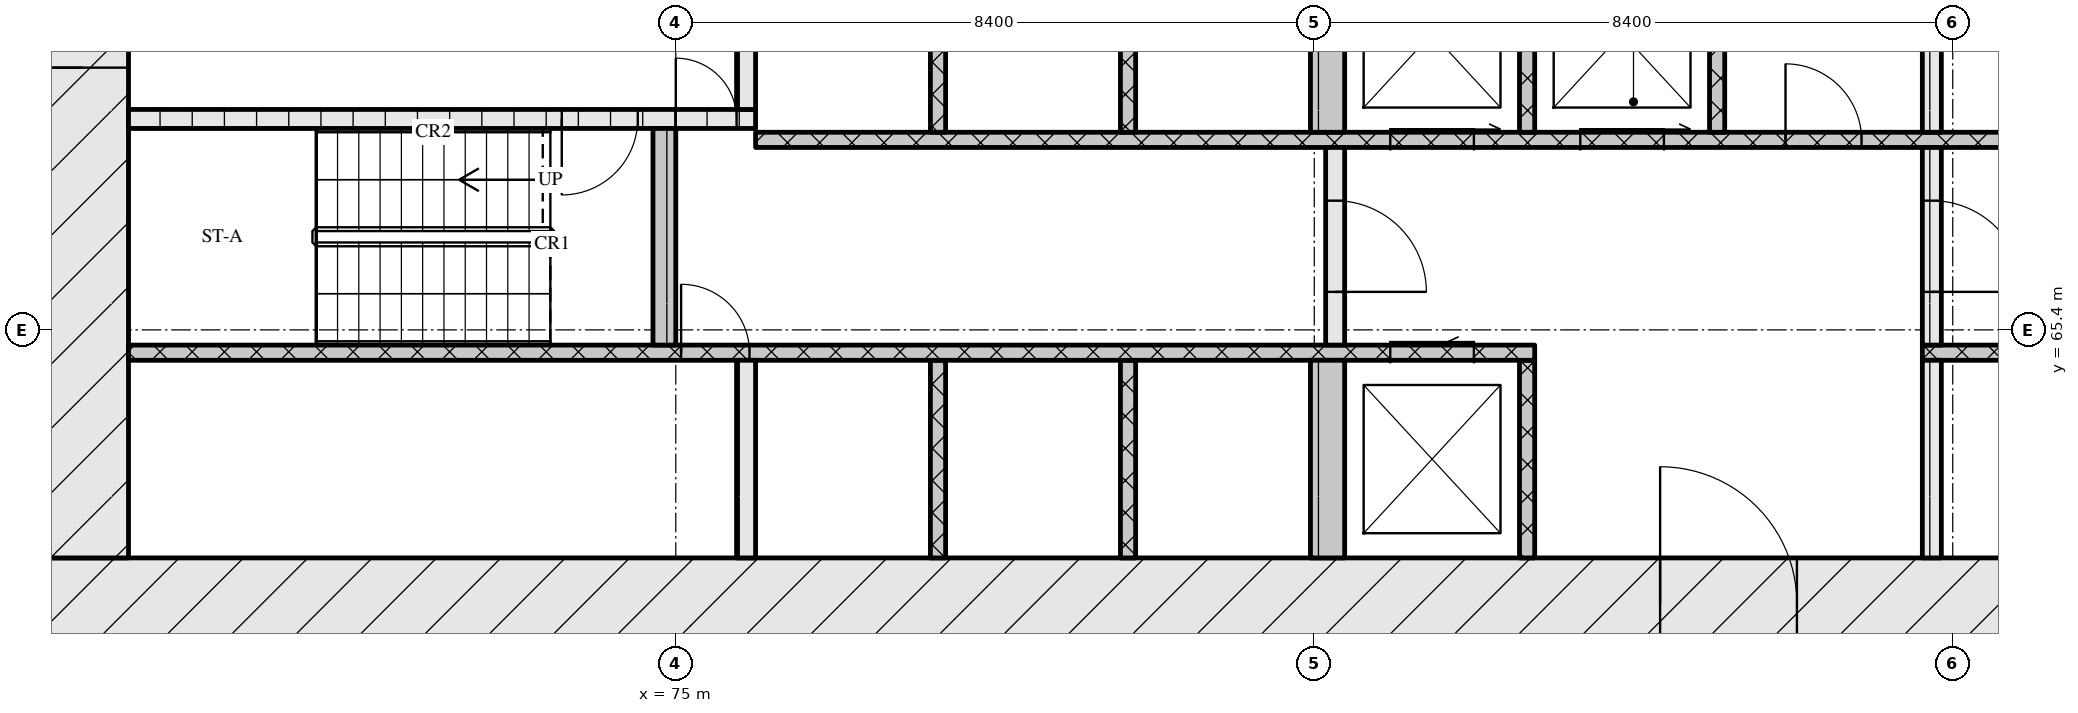
"""IFC4 building model, lengths in metres.
Left out: names, types, materials, properties, quantities, classifications, styles, units other than length and angle.
Written with IfcOpenShell. Run it as: python <this file> out.ifc"""

import sys

from ifc_helpers import new_model, si_unit, direction, frame, frame_2d, origin, place, context, subcontext, project, spatial, rectangle, extrude, element, fill, save


model = new_model("IFC4")
c1 = context("Model", 3, precision=1e-05, world=origin(), true_north=direction((0.0, 1.0)))
c2 = subcontext(c1, "Body", "Model", "MODEL_VIEW")
j1 = project(units=[si_unit("LENGTHUNIT", "METRE"), si_unit("PLANEANGLEUNIT", "RADIAN")], contexts=[c1])
p1 = place(None, origin())
s1 = spatial("IfcSite", under=j1, at=p1, CompositionType="ELEMENT")
p2 = place(p1, origin())
s2 = spatial("IfcBuilding", under=s1, at=p2, CompositionType="ELEMENT")
p3 = place(p2, frame((0.0, 0.0, 32.7)))
s3 = spatial("IfcBuildingStorey", under=s2, at=p3, CompositionType="ELEMENT", Elevation=32.7)
p4 = place(p3, frame((66.6, 61.8, 0.0), z_axis=(0.0, 0.0, 1.0), x_axis=(1.0, 0.0, 0.0)))
e1 = element("IfcWall", 1, at=p4, inside=s3, PredefinedType="SOLIDWALL", context=c2, shape_type="SweptSolid", body=[
    extrude(rectangle(XDim=42.0, YDim=1.2, at=frame_2d((21.0, 0.0))), origin(), (0.0, 0.0, 1.0), 4.22),
])
p5 = place(p4, frame((21.35, 0.0, 0.0)))
e2 = element("IfcOpeningElement", 2, at=p5, cuts=e1, PredefinedType="OPENING", context=c2, shape_type="SweptSolid", body=[
    extrude(rectangle(XDim=1.8, YDim=2.1, at=frame_2d((0.9, 1.05))), frame((0.0, 0.61, 0.0), z_axis=(0.0, -1.0, 0.0), x_axis=(1.0, 0.0, 0.0)), (0.0, 0.0, 1.0), 1.22),
])
p6 = place(p3, frame((67.2, 62.4, 0.0), z_axis=(0.0, 0.0, 1.0), x_axis=(0.0, 1.0, 0.0)))
e3 = element("IfcWall", 3, at=p6, inside=s3, PredefinedType="SOLIDWALL", context=c2, shape_type="SweptSolid", body=[
    extrude(rectangle(XDim=12.0, YDim=1.2, at=frame_2d((6.0, 0.0))), origin(), (0.0, 0.0, 1.0), 4.22),
])
p7 = place(p6, frame((6.45, 0.0, 0.0)))
e4 = element("IfcOpeningElement", 4, at=p7, cuts=e3, PredefinedType="OPENING", context=c2, shape_type="SweptSolid", body=[
    extrude(rectangle(XDim=1.2, YDim=2.1, at=frame_2d((0.6, 1.05))), frame((0.0, 0.61, 0.0), z_axis=(0.0, -1.0, 0.0), x_axis=(1.0, 0.0, 0.0)), (0.0, 0.0, 1.0), 1.22),
])
p8 = place(p3, frame((75.925, 62.4, 0.0), z_axis=(0.0, 0.0, 1.0), x_axis=(0.0, 1.0, 0.0)))
e5 = element("IfcWall", 5, at=p8, inside=s3, PredefinedType="SOLIDWALL", context=c2, shape_type="SweptSolid", body=[
    extrude(rectangle(XDim=2.6, YDim=0.25, at=frame_2d((1.3, 0.0))), origin(), (0.0, 0.0, 1.0), 4.22),
])
for number, where, z_axis, x_axis in (
    (6, (78.45, 62.4, 0.0), (0.0, 0.0, 1.0), (0.0, 1.0, 0.0)),
    (7, (80.95, 62.4, 0.0), (0.0, 0.0, 1.0), (0.0, 1.0, 0.0)),
):
    element("IfcWall", number, at=place(p3, frame(where, z_axis=z_axis, x_axis=x_axis)), inside=s3, PredefinedType="SOLIDWALL", context=c2, shape_type="SweptSolid", body=[
        extrude(rectangle(XDim=2.6, YDim=0.2, at=frame_2d((1.3, 0.0))), origin(), (0.0, 0.0, 1.0), 4.22),
    ])
p9 = place(p3, frame((83.575, 62.4, 0.0), z_axis=(0.0, 0.0, 1.0), x_axis=(0.0, 1.0, 0.0)))
e8 = element("IfcWall", 8, at=p9, inside=s3, PredefinedType="SOLIDWALL", context=c2, shape_type="SweptSolid", body=[
    extrude(rectangle(XDim=2.6, YDim=0.45, at=frame_2d((1.3, 0.0))), origin(), (0.0, 0.0, 1.0), 4.22),
])
p10 = place(p3, frame((86.2, 62.4, 0.0), z_axis=(0.0, 0.0, 1.0), x_axis=(0.0, 1.0, 0.0)))
e9 = element("IfcWall", 9, at=p10, inside=s3, PredefinedType="SOLIDWALL", context=c2, shape_type="SweptSolid", body=[
    extrude(rectangle(XDim=2.6, YDim=0.2, at=frame_2d((1.3, 0.0))), origin(), (0.0, 0.0, 1.0), 4.22),
])
p11 = place(p3, frame((91.525, 62.4, 0.0), z_axis=(0.0, 0.0, 1.0), x_axis=(0.0, 1.0, 0.0)))
e10 = element("IfcWall", 10, at=p11, inside=s3, PredefinedType="SOLIDWALL", context=c2, shape_type="SweptSolid", body=[
    extrude(rectangle(XDim=2.6, YDim=0.25, at=frame_2d((1.3, 0.0))), origin(), (0.0, 0.0, 1.0), 4.22),
])
p12 = place(p3, frame((67.8, 65.1, 0.0), z_axis=(0.0, 0.0, 1.0), x_axis=(1.0, 0.0, 0.0)))
e11 = element("IfcWall", 11, at=p12, inside=s3, PredefinedType="SOLIDWALL", context=c2, shape_type="SweptSolid", body=[
    extrude(rectangle(XDim=18.5, YDim=0.2, at=frame_2d((9.25, 0.0))), origin(), (0.0, 0.0, 1.0), 4.22),
])
p13 = place(p12, frame((7.27, 0.0, 0.0)))
e12 = element("IfcOpeningElement", 12, at=p13, cuts=e11, PredefinedType="OPENING", context=c2, shape_type="SweptSolid", body=[
    extrude(rectangle(XDim=0.9, YDim=2.1, at=frame_2d((0.45, 1.05))), frame((0.0, 0.11, 0.0), z_axis=(0.0, -1.0, 0.0), x_axis=(1.0, 0.0, 0.0)), (0.0, 0.0, 1.0), 0.22),
])
p14 = place(p12, frame((16.6, 0.0, 0.0)))
e13 = element("IfcOpeningElement", 13, at=p14, cuts=e11, PredefinedType="OPENING", context=c2, shape_type="SweptSolid", body=[
    extrude(rectangle(XDim=1.1, YDim=2.1, at=frame_2d((0.55, 1.05))), frame((0.0, 0.11, 0.0), z_axis=(0.0, -1.0, 0.0), x_axis=(1.0, 0.0, 0.0)), (0.0, 0.0, 1.0), 0.22),
])
p15 = place(p3, frame((91.4, 65.1, 0.0), z_axis=(0.0, 0.0, 1.0), x_axis=(1.0, 0.0, 0.0)))
e14 = element("IfcWall", 14, at=p15, inside=s3, PredefinedType="SOLIDWALL", context=c2, shape_type="SweptSolid", body=[
    extrude(rectangle(XDim=16.0, YDim=0.2, at=frame_2d((8.0, 0.0))), origin(), (0.0, 0.0, 1.0), 4.22),
])
p16 = place(p15, frame((7.83, 0.0, 0.0)))
e15 = element("IfcOpeningElement", 15, at=p16, cuts=e14, PredefinedType="OPENING", context=c2, shape_type="SweptSolid", body=[
    extrude(rectangle(XDim=0.9, YDim=2.1, at=frame_2d((0.45, 1.05))), frame((0.0, 0.11, 0.0), z_axis=(0.0, -1.0, 0.0), x_axis=(1.0, 0.0, 0.0)), (0.0, 0.0, 1.0), 0.22),
])
p17 = place(p3, frame((74.85, 65.2, 0.0), z_axis=(0.0, 0.0, 1.0), x_axis=(0.0, 1.0, 0.0)))
e16 = element("IfcWall", 16, at=p17, inside=s3, PredefinedType="SOLIDWALL", context=c2, shape_type="SweptSolid", body=[
    extrude(rectangle(XDim=2.85, YDim=0.3, at=frame_2d((1.425, 0.0))), origin(), (0.0, 0.0, 1.0), 4.22),
])
p18 = place(p3, frame((83.675, 65.2, 0.0), z_axis=(0.0, 0.0, 1.0), x_axis=(0.0, 1.0, 0.0)))
e17 = element("IfcWall", 17, at=p18, inside=s3, PredefinedType="SOLIDWALL", context=c2, shape_type="SweptSolid", body=[
    extrude(rectangle(XDim=2.6, YDim=0.25, at=frame_2d((1.3, 0.0))), origin(), (0.0, 0.0, 1.0), 4.22),
])
p19 = place(p18, frame((0.7, 0.0, 0.0)))
e18 = element("IfcOpeningElement", 18, at=p19, cuts=e17, PredefinedType="OPENING", context=c2, shape_type="SweptSolid", body=[
    extrude(rectangle(XDim=1.2, YDim=2.1, at=frame_2d((0.6, 1.05))), frame((0.0, 0.135, 0.0), z_axis=(0.0, -1.0, 0.0), x_axis=(1.0, 0.0, 0.0)), (0.0, 0.0, 1.0), 0.27),
])
p20 = place(p3, frame((91.525, 65.2, 0.0), z_axis=(0.0, 0.0, 1.0), x_axis=(0.0, 1.0, 0.0)))
e19 = element("IfcWall", 19, at=p20, inside=s3, PredefinedType="SOLIDWALL", context=c2, shape_type="SweptSolid", body=[
    extrude(rectangle(XDim=2.6, YDim=0.25, at=frame_2d((1.3, 0.0))), origin(), (0.0, 0.0, 1.0), 4.22),
])
p21 = place(p20, frame((0.7, 0.0, 0.0)))
e20 = element("IfcOpeningElement", 20, at=p21, cuts=e19, PredefinedType="OPENING", context=c2, shape_type="SweptSolid", body=[
    extrude(rectangle(XDim=1.2, YDim=2.1, at=frame_2d((0.6, 1.05))), frame((0.0, 0.135, 0.0), z_axis=(0.0, -1.0, 0.0), x_axis=(1.0, 0.0, 0.0)), (0.0, 0.0, 1.0), 0.27),
])
p22 = place(p3, frame((76.05, 67.9, 0.0), z_axis=(0.0, 0.0, 1.0), x_axis=(1.0, 0.0, 0.0)))
e21 = element("IfcWall", 21, at=p22, inside=s3, PredefinedType="SOLIDWALL", context=c2, shape_type="SweptSolid", body=[
    extrude(rectangle(XDim=23.1, YDim=0.2, at=frame_2d((11.55, 0.0))), origin(), (0.0, 0.0, 1.0), 4.22),
])
p23 = place(p22, frame((8.35, 0.0, 0.0)))
e22 = element("IfcOpeningElement", 22, at=p23, cuts=e21, PredefinedType="OPENING", context=c2, shape_type="SweptSolid", body=[
    extrude(rectangle(XDim=1.1, YDim=2.1, at=frame_2d((0.55, 1.05))), frame((0.0, 0.11, 0.0), z_axis=(0.0, -1.0, 0.0), x_axis=(1.0, 0.0, 0.0)), (0.0, 0.0, 1.0), 0.22),
])
p24 = place(p22, frame((10.85, 0.0, 0.0)))
e23 = element("IfcOpeningElement", 23, at=p24, cuts=e21, PredefinedType="OPENING", context=c2, shape_type="SweptSolid", body=[
    extrude(rectangle(XDim=1.1, YDim=2.1, at=frame_2d((0.55, 1.05))), frame((0.0, 0.11, 0.0), z_axis=(0.0, -1.0, 0.0), x_axis=(1.0, 0.0, 0.0)), (0.0, 0.0, 1.0), 0.22),
])
p25 = place(p22, frame((13.55, 0.0, 0.0)))
e24 = element("IfcOpeningElement", 24, at=p25, cuts=e21, PredefinedType="OPENING", context=c2, shape_type="SweptSolid", body=[
    extrude(rectangle(XDim=1.0, YDim=2.1, at=frame_2d((0.5, 1.05))), frame((0.0, 0.11, 0.0), z_axis=(0.0, -1.0, 0.0), x_axis=(1.0, 0.0, 0.0)), (0.0, 0.0, 1.0), 0.22),
])
for number, where, z_axis, x_axis in (
    (25, (78.45, 68.0, 0.0), (0.0, 0.0, 1.0), (0.0, 1.0, 0.0)),
    (26, (80.95, 68.0, 0.0), (0.0, 0.0, 1.0), (0.0, 1.0, 0.0)),
):
    element("IfcWall", number, at=place(p3, frame(where, z_axis=z_axis, x_axis=x_axis)), inside=s3, PredefinedType="SOLIDWALL", context=c2, shape_type="SweptSolid", body=[
        extrude(rectangle(XDim=2.6, YDim=0.2, at=frame_2d((1.3, 0.0))), origin(), (0.0, 0.0, 1.0), 4.22),
    ])
p26 = place(p3, frame((83.575, 68.0, 0.0), z_axis=(0.0, 0.0, 1.0), x_axis=(0.0, 1.0, 0.0)))
e27 = element("IfcWall", 27, at=p26, inside=s3, PredefinedType="SOLIDWALL", context=c2, shape_type="SweptSolid", body=[
    extrude(rectangle(XDim=2.6, YDim=0.45, at=frame_2d((1.3, 0.0))), origin(), (0.0, 0.0, 1.0), 4.22),
])
for number, where, z_axis, x_axis in (
    (28, (86.2, 68.0, 0.0), (0.0, 0.0, 1.0), (0.0, 1.0, 0.0)),
    (29, (88.7, 68.0, 0.0), (0.0, 0.0, 1.0), (0.0, 1.0, 0.0)),
):
    element("IfcWall", number, at=place(p3, frame(where, z_axis=z_axis, x_axis=x_axis)), inside=s3, PredefinedType="SOLIDWALL", context=c2, shape_type="SweptSolid", body=[
        extrude(rectangle(XDim=2.6, YDim=0.2, at=frame_2d((1.3, 0.0))), origin(), (0.0, 0.0, 1.0), 4.22),
    ])
p27 = place(p3, frame((91.525, 68.0, 0.0), z_axis=(0.0, 0.0, 1.0), x_axis=(0.0, 1.0, 0.0)))
e30 = element("IfcWall", 30, at=p27, inside=s3, PredefinedType="SOLIDWALL", context=c2, shape_type="SweptSolid", body=[
    extrude(rectangle(XDim=2.6, YDim=0.25, at=frame_2d((1.3, 0.0))), origin(), (0.0, 0.0, 1.0), 4.22),
])
p28 = place(p3, frame((67.8, 68.175, 0.0), z_axis=(0.0, 0.0, 1.0), x_axis=(1.0, 0.0, 0.0)))
e31 = element("IfcWall", 31, at=p28, inside=s3, PredefinedType="SOLIDWALL", context=c2, shape_type="SweptSolid", body=[
    extrude(rectangle(XDim=8.25, YDim=0.25, at=frame_2d((4.125, 0.0))), origin(), (0.0, 0.0, 1.0), 4.22),
])
p29 = place(p28, frame((5.7, 0.0, 0.0)))
e32 = element("IfcOpeningElement", 32, at=p29, cuts=e31, PredefinedType="OPENING", context=c2, shape_type="SweptSolid", body=[
    extrude(rectangle(XDim=1.0, YDim=2.1, at=frame_2d((0.5, 1.05))), frame((0.0, 0.135, 0.0), z_axis=(0.0, -1.0, 0.0), x_axis=(1.0, 0.0, 0.0)), (0.0, 0.0, 1.0), 0.27),
])
p30 = place(p28, frame((7.2, 0.0, 0.0)))
e33 = element("IfcOpeningElement", 33, at=p30, cuts=e31, PredefinedType="OPENING", context=c2, shape_type="SweptSolid", body=[
    extrude(rectangle(XDim=0.8, YDim=2.1, at=frame_2d((0.4, 1.05))), frame((0.0, 0.135, 0.0), z_axis=(0.0, -1.0, 0.0), x_axis=(1.0, 0.0, 0.0)), (0.0, 0.0, 1.0), 0.27),
])
p31 = place(p3, frame((75.925, 68.3, 0.0), z_axis=(0.0, 0.0, 1.0), x_axis=(0.0, 1.0, 0.0)))
e34 = element("IfcWall", 34, at=p31, inside=s3, PredefinedType="SOLIDWALL", context=c2, shape_type="SweptSolid", body=[
    extrude(rectangle(XDim=2.3, YDim=0.25, at=frame_2d((1.15, 0.0))), origin(), (0.0, 0.0, 1.0), 4.22),
])
p32 = place(p5, origin())
e35 = element("IfcDoor", 35, at=p32, inside=s3, OperationType="DOUBLE_DOOR_SINGLE_SWING", PredefinedType="DOOR", context=c2, shape_type="SweptSolid", body=[
    extrude(rectangle(XDim=1.8, YDim=2.1, at=frame_2d((0.9, 1.05))), frame((0.0, 0.025, 0.0), z_axis=(0.0, -1.0, 0.0), x_axis=(1.0, 0.0, 0.0)), (0.0, 0.0, 1.0), 0.05),
])
fill(e2, e35)
p33 = place(p13, origin())
e36 = element("IfcDoor", 36, at=p33, inside=s3, OperationType="SINGLE_SWING_LEFT", PredefinedType="DOOR", context=c2, shape_type="SweptSolid", body=[
    extrude(rectangle(XDim=0.9, YDim=2.1, at=frame_2d((0.45, 1.05))), frame((0.0, 0.025, 0.0), z_axis=(0.0, -1.0, 0.0), x_axis=(1.0, 0.0, 0.0)), (0.0, 0.0, 1.0), 0.05),
])
fill(e12, e36)
p34 = place(p14, origin())
e37 = element("IfcDoor", 37, at=p34, inside=s3, OperationType="SLIDING_TO_LEFT", PredefinedType="DOOR", context=c2, shape_type="SweptSolid", body=[
    extrude(rectangle(XDim=1.1, YDim=2.1, at=frame_2d((0.55, 1.05))), frame((0.0, 0.025, 0.0), z_axis=(0.0, -1.0, 0.0), x_axis=(1.0, 0.0, 0.0)), (0.0, 0.0, 1.0), 0.05),
])
fill(e13, e37)
p35 = place(p19, origin())
e38 = element("IfcDoor", 38, at=p35, inside=s3, OperationType="SINGLE_SWING_RIGHT", PredefinedType="DOOR", context=c2, shape_type="SweptSolid", body=[
    extrude(rectangle(XDim=1.2, YDim=2.1, at=frame_2d((0.6, 1.05))), frame((0.0, 0.025, 0.0), z_axis=(0.0, -1.0, 0.0), x_axis=(1.0, 0.0, 0.0)), (0.0, 0.0, 1.0), 0.05),
])
fill(e18, e38)
p36 = place(p21, origin())
e39 = element("IfcDoor", 39, at=p36, inside=s3, OperationType="SINGLE_SWING_RIGHT", PredefinedType="DOOR", context=c2, shape_type="SweptSolid", body=[
    extrude(rectangle(XDim=1.2, YDim=2.1, at=frame_2d((0.6, 1.05))), frame((0.0, 0.025, 0.0), z_axis=(0.0, -1.0, 0.0), x_axis=(1.0, 0.0, 0.0)), (0.0, 0.0, 1.0), 0.05),
])
fill(e20, e39)
p37 = place(p23, origin())
e40 = element("IfcDoor", 40, at=p37, inside=s3, OperationType="SLIDING_TO_RIGHT", PredefinedType="DOOR", context=c2, shape_type="SweptSolid", body=[
    extrude(rectangle(XDim=1.1, YDim=2.1, at=frame_2d((0.55, 1.05))), frame((0.0, 0.025, 0.0), z_axis=(0.0, -1.0, 0.0), x_axis=(1.0, 0.0, 0.0)), (0.0, 0.0, 1.0), 0.05),
])
fill(e22, e40)
p38 = place(p24, origin())
e41 = element("IfcDoor", 41, at=p38, inside=s3, OperationType="SLIDING_TO_RIGHT", PredefinedType="DOOR", context=c2, shape_type="SweptSolid", body=[
    extrude(rectangle(XDim=1.1, YDim=2.1, at=frame_2d((0.55, 1.05))), frame((0.0, 0.025, 0.0), z_axis=(0.0, -1.0, 0.0), x_axis=(1.0, 0.0, 0.0)), (0.0, 0.0, 1.0), 0.05),
])
fill(e23, e41)
p39 = place(p25, origin())
e42 = element("IfcDoor", 42, at=p39, inside=s3, OperationType="SINGLE_SWING_LEFT", PredefinedType="DOOR", context=c2, shape_type="SweptSolid", body=[
    extrude(rectangle(XDim=1.0, YDim=2.1, at=frame_2d((0.5, 1.05))), frame((0.0, 0.025, 0.0), z_axis=(0.0, -1.0, 0.0), x_axis=(1.0, 0.0, 0.0)), (0.0, 0.0, 1.0), 0.05),
])
fill(e24, e42)
p40 = place(p29, origin())
e43 = element("IfcDoor", 43, at=p40, inside=s3, OperationType="SINGLE_SWING_RIGHT", PredefinedType="DOOR", context=c2, shape_type="SweptSolid", body=[
    extrude(rectangle(XDim=1.0, YDim=2.1, at=frame_2d((0.5, 1.05))), frame((0.0, 0.025, 0.0), z_axis=(0.0, -1.0, 0.0), x_axis=(1.0, 0.0, 0.0)), (0.0, 0.0, 1.0), 0.05),
])
fill(e32, e43)
p41 = place(p30, origin())
e44 = element("IfcDoor", 44, at=p41, inside=s3, OperationType="SINGLE_SWING_LEFT", PredefinedType="DOOR", context=c2, shape_type="SweptSolid", body=[
    extrude(rectangle(XDim=0.8, YDim=2.1, at=frame_2d((0.4, 1.05))), frame((0.0, 0.025, 0.0), z_axis=(0.0, -1.0, 0.0), x_axis=(1.0, 0.0, 0.0)), (0.0, 0.0, 1.0), 0.05),
])
fill(e33, e44)
p42 = place(p7, origin())
e45 = element("IfcDoor", 45, at=p42, inside=s3, OperationType="SINGLE_SWING_LEFT", PredefinedType="DOOR", context=c2, shape_type="SweptSolid", body=[
    extrude(rectangle(XDim=1.2, YDim=2.1, at=frame_2d((0.6, 1.05))), frame((0.0, 0.025, 0.0), z_axis=(0.0, -1.0, 0.0), x_axis=(1.0, 0.0, 0.0)), (0.0, 0.0, 1.0), 0.05),
])
fill(e4, e45)
save(model, sys.argv[1])
